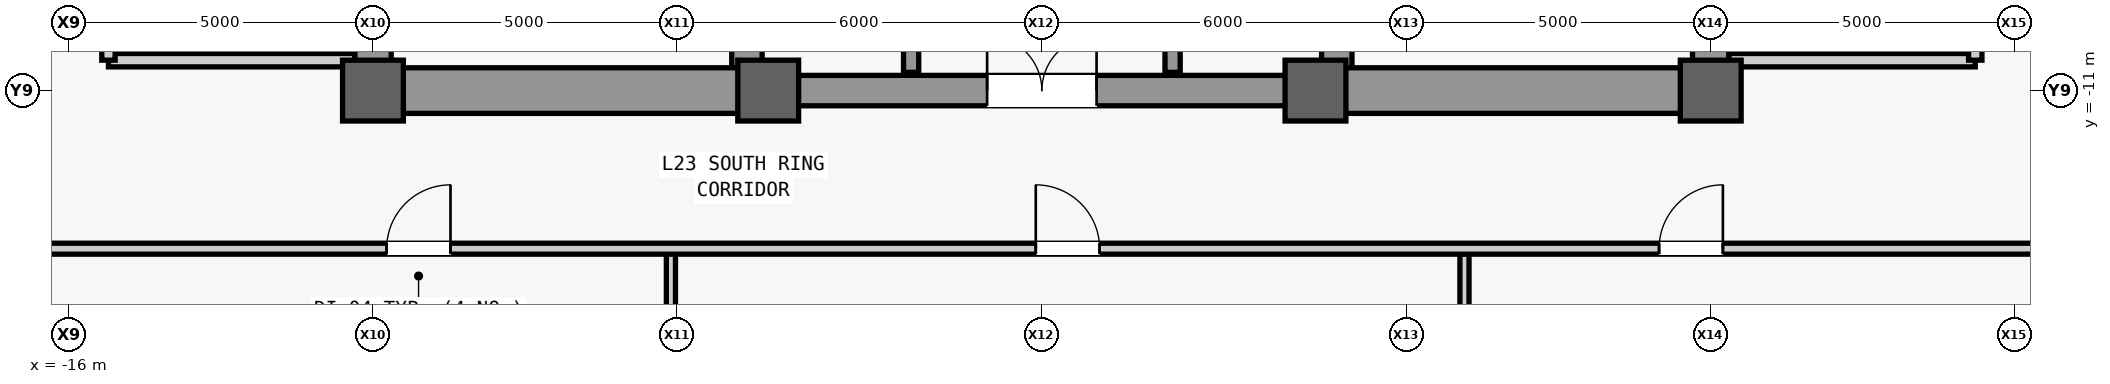
"""IFC4 building model, lengths in metres.
Left out: names, types, materials, properties, quantities, classifications, styles, units other than length and angle.
Written with IfcOpenShell. Run it as: python <this file> out.ifc"""

import sys

from ifc_helpers import new_model, si_unit, direction, frame, frame_2d, origin, origin_2d, place, context, subcontext, project, spatial, rectangle, extrude, source, transform, mapped, element, fill, save


model = new_model("IFC4")
c1 = context("Model", 3, precision=1e-05, world=origin(), true_north=direction((0.0, 1.0)))
c2 = subcontext(c1, "Body", "Model", "MODEL_VIEW")
j1 = project(units=[si_unit("LENGTHUNIT", "METRE"), si_unit("PLANEANGLEUNIT", "RADIAN")], contexts=[c1])
p1 = place(None, origin())
s1 = spatial("IfcSite", under=j1, at=p1, CompositionType="ELEMENT")
p2 = place(p1, origin())
s2 = spatial("IfcBuilding", under=s1, at=p2, CompositionType="ELEMENT")
p3 = place(p2, frame((0.0, 0.0, 103.7)))
s3 = spatial("IfcBuildingStorey", under=s2, at=p3, CompositionType="ELEMENT", Elevation=103.7)
m1 = source(origin(), c2, "Body", "SweptSolid", [
    extrude(rectangle(XDim=22.0, YDim=0.6, at=frame_2d((11.0, 0.0))), origin(), (0.0, 0.0, 1.0), 3.84),
])
p4 = place(p3, frame((-11.0, -11.0, 0.0), z_axis=(0.0, 0.0, 1.0), x_axis=(0.0, 1.0, 0.0)))
e1 = element("IfcWall", 1, at=p4, inside=s3, PredefinedType="SHEAR", context=c2, shape_type="MappedRepresentation", body=[
    mapped(m1, transform((0.0, 0.0, 0.0), scale=1.0)),
])
m2 = source(origin(), c2, "Body", "SweptSolid", [
    extrude(rectangle(XDim=1.1, YDim=2.2, at=frame_2d((0.55, 1.1))), frame((0.0, 0.31, 0.0), z_axis=(0.0, -1.0, 0.0), x_axis=(1.0, 0.0, 0.0)), (0.0, 0.0, 1.0), 0.62),
])
p5 = place(p4, frame((0.8, 0.0, 0.0)))
e2 = element("IfcOpeningElement", 2, at=p5, cuts=e1, PredefinedType="OPENING", context=c2, shape_type="MappedRepresentation", body=[
    mapped(m2, transform((0.0, 0.0, 0.0), scale=1.0)),
])
p6 = place(p4, frame((12.5, 0.0, 0.0)))
e3 = element("IfcOpeningElement", 3, at=p6, cuts=e1, PredefinedType="OPENING", context=c2, shape_type="MappedRepresentation", body=[
    mapped(m2, transform((0.0, 0.0, 0.0), scale=1.0)),
])
m3 = source(origin(), c2, "Body", "SweptSolid", [
    extrude(rectangle(XDim=0.9, YDim=2.15, at=frame_2d((0.45, 1.075))), frame((0.0, 0.31, 0.0), z_axis=(0.0, -1.0, 0.0), x_axis=(1.0, 0.0, 0.0)), (0.0, 0.0, 1.0), 0.62),
])
p7 = place(p4, frame((6.2, 0.0, 0.0)))
e4 = element("IfcOpeningElement", 4, at=p7, cuts=e1, PredefinedType="OPENING", context=c2, shape_type="MappedRepresentation", body=[
    mapped(m3, transform((0.0, 0.0, 0.0), scale=1.0)),
])
p8 = place(p4, frame((8.525, 0.0, 0.0)))
e5 = element("IfcOpeningElement", 5, at=p8, cuts=e1, PredefinedType="OPENING", context=c2, shape_type="MappedRepresentation", body=[
    mapped(m3, transform((0.0, 0.0, 0.0), scale=1.0)),
])
m4 = source(origin(), c2, "Body", "SweptSolid", [
    extrude(rectangle(XDim=1.3, YDim=2.3, at=frame_2d((0.65, 1.15))), frame((0.0, 0.31, 0.0), z_axis=(0.0, -1.0, 0.0), x_axis=(1.0, 0.0, 0.0)), (0.0, 0.0, 1.0), 0.62),
])
p9 = place(p4, frame((2.7, 0.0, 0.0)))
e6 = element("IfcOpeningElement", 6, at=p9, cuts=e1, PredefinedType="OPENING", context=c2, shape_type="MappedRepresentation", body=[
    mapped(m4, transform((0.0, 0.0, 0.0), scale=1.0)),
])
p10 = place(p3, frame((11.0, -11.0, 0.0), z_axis=(0.0, 0.0, 1.0), x_axis=(0.0, 1.0, 0.0)))
e7 = element("IfcWall", 7, at=p10, inside=s3, PredefinedType="SHEAR", context=c2, shape_type="MappedRepresentation", body=[
    mapped(m1, transform((0.0, 0.0, 0.0), scale=1.0)),
])
p11 = place(p10, frame((0.8, 0.0, 0.0)))
e8 = element("IfcOpeningElement", 8, at=p11, cuts=e7, PredefinedType="OPENING", context=c2, shape_type="MappedRepresentation", body=[
    mapped(m2, transform((0.0, 0.0, 0.0), scale=1.0)),
])
p12 = place(p10, frame((6.2, 0.0, 0.0)))
e9 = element("IfcOpeningElement", 9, at=p12, cuts=e7, PredefinedType="OPENING", context=c2, shape_type="MappedRepresentation", body=[
    mapped(m3, transform((0.0, 0.0, 0.0), scale=1.0)),
])
p13 = place(p10, frame((8.525, 0.0, 0.0)))
e10 = element("IfcOpeningElement", 10, at=p13, cuts=e7, PredefinedType="OPENING", context=c2, shape_type="MappedRepresentation", body=[
    mapped(m3, transform((0.0, 0.0, 0.0), scale=1.0)),
])
p14 = place(p10, frame((2.7, 0.0, 0.0)))
e11 = element("IfcOpeningElement", 11, at=p14, cuts=e7, PredefinedType="OPENING", context=c2, shape_type="MappedRepresentation", body=[
    mapped(m4, transform((0.0, 0.0, 0.0), scale=1.0)),
])
p15 = place(p10, frame((13.35, 0.0, 0.0)))
e12 = element("IfcOpeningElement", 12, at=p15, cuts=e7, PredefinedType="OPENING", context=c2, shape_type="MappedRepresentation", body=[
    mapped(m4, transform((0.0, 0.0, 0.0), scale=1.0)),
])
m5 = source(origin(), c2, "Body", "SweptSolid", [
    extrude(rectangle(XDim=21.4, YDim=0.5, at=frame_2d((10.7, 0.0))), origin(), (0.0, 0.0, 1.0), 3.84),
])
for number, where, z_axis, x_axis in (
    (13, (-4.85, -10.7, 0.0), (0.0, 0.0, 1.0), (0.0, 1.0, 0.0)),
    (14, (4.85, -10.7, 0.0), (0.0, 0.0, 1.0), (0.0, 1.0, 0.0)),
):
    element("IfcWall", number, at=place(p3, frame(where, z_axis=z_axis, x_axis=x_axis)), inside=s3, PredefinedType="SHEAR", context=c2, shape_type="MappedRepresentation", body=[
        mapped(m5, transform((0.0, 0.0, 0.0), scale=1.0)),
    ])
m6 = source(origin(), c2, "Body", "SweptSolid", [
    extrude(rectangle(XDim=5.85, YDim=0.75, at=frame_2d((2.925, 0.0))), origin(), (0.0, 0.0, 1.0), 3.84),
])
for number, where, z_axis, x_axis in (
    (15, (-10.7, -11.0, 0.0), (0.0, 0.0, 1.0), (1.0, 0.0, 0.0)),
    (16, (4.85, -11.0, 0.0), (0.0, 0.0, 1.0), (1.0, 0.0, 0.0)),
):
    element("IfcWall", number, at=place(p3, frame(where, z_axis=z_axis, x_axis=x_axis)), inside=s3, PredefinedType="SHEAR", context=c2, shape_type="MappedRepresentation", body=[
        mapped(m6, transform((0.0, 0.0, 0.0), scale=1.0)),
    ])
m7 = source(origin(), c2, "Body", "SweptSolid", [
    extrude(rectangle(XDim=9.2, YDim=0.5, at=frame_2d((4.6, 0.0))), origin(), (0.0, 0.0, 1.0), 3.84),
])
p16 = place(p3, frame((-4.6, -11.0, 0.0), z_axis=(0.0, 0.0, 1.0), x_axis=(1.0, 0.0, 0.0)))
e17 = element("IfcWall", 17, at=p16, inside=s3, PredefinedType="SHEAR", context=c2, shape_type="MappedRepresentation", body=[
    mapped(m7, transform((0.0, 0.0, 0.0), scale=1.0)),
])
m8 = source(origin(), c2, "Body", "SweptSolid", [
    extrude(rectangle(XDim=1.8, YDim=2.25, at=frame_2d((0.9, 1.125))), frame((0.0, 0.26, 0.0), z_axis=(0.0, -1.0, 0.0), x_axis=(1.0, 0.0, 0.0)), (0.0, 0.0, 1.0), 0.52),
])
p17 = place(p16, frame((3.7, 0.0, 0.0)))
e18 = element("IfcOpeningElement", 18, at=p17, cuts=e17, PredefinedType="OPENING", context=c2, shape_type="MappedRepresentation", body=[
    mapped(m8, transform((0.0, 0.0, 0.0), scale=1.0)),
])
m9 = source(origin(), c2, "Body", "SweptSolid", [
    extrude(rectangle(XDim=1.0, YDim=1.0, at=origin_2d()), origin(), (0.0, 0.0, 1.0), 4.1),
])
for number, where, z_axis, x_axis in (
    (19, (-11.0, -11.0, 0.0), (0.0, 0.0, 1.0), (1.0, 0.0, 0.0)),
    (20, (-4.5, -11.0, 0.0), (0.0, 0.0, 1.0), (1.0, 0.0, 0.0)),
    (21, (4.5, -11.0, 0.0), (0.0, 0.0, 1.0), (1.0, 0.0, 0.0)),
    (22, (11.0, -11.0, 0.0), (0.0, 0.0, 1.0), (1.0, 0.0, 0.0)),
):
    element("IfcColumn", number, at=place(p3, frame(where, z_axis=z_axis, x_axis=x_axis)), inside=s3, PredefinedType="COLUMN", context=c2, shape_type="MappedRepresentation", body=[
        mapped(m9, transform((0.0, 0.0, 0.0), scale=1.0)),
    ])
m10 = source(origin(), c2, "Body", "SweptSolid", [
    extrude(rectangle(XDim=4.05, YDim=0.22, at=frame_2d((2.025, 0.0))), origin(), (0.0, 0.0, 1.0), 3.84),
])
p18 = place(p3, frame((-15.35, -10.5, 0.0), z_axis=(0.0, 0.0, 1.0), x_axis=(1.0, 0.0, 0.0)))
e23 = element("IfcWall", 23, at=p18, inside=s3, PredefinedType="PARTITIONING", context=c2, shape_type="MappedRepresentation", body=[
    mapped(m10, transform((0.0, 0.0, 0.0), scale=1.0)),
])
m11 = source(origin(), c2, "Body", "SweptSolid", [
    extrude(rectangle(XDim=4.4, YDim=0.22, at=frame_2d((2.2, 0.0))), origin(), (0.0, 0.0, 1.0), 3.84),
])
p19 = place(p3, frame((-15.35, -10.5, 0.0), z_axis=(0.0, 0.0, 1.0), x_axis=(0.0, 1.0, 0.0)))
e24 = element("IfcWall", 24, at=p19, inside=s3, PredefinedType="PARTITIONING", context=c2, shape_type="MappedRepresentation", body=[
    mapped(m11, transform((0.0, 0.0, 0.0), scale=1.0)),
])
m12 = source(origin(), c2, "Body", "SweptSolid", [
    extrude(rectangle(XDim=1.2, YDim=2.2, at=frame_2d((0.6, 1.1))), frame((0.0, 0.12, 0.0), z_axis=(0.0, -1.0, 0.0), x_axis=(1.0, 0.0, 0.0)), (0.0, 0.0, 1.0), 0.24),
])
p20 = place(p19, frame((1.6, 0.0, 0.0)))
e25 = element("IfcOpeningElement", 25, at=p20, cuts=e24, PredefinedType="OPENING", context=c2, shape_type="MappedRepresentation", body=[
    mapped(m12, transform((0.0, 0.0, 0.0), scale=1.0)),
])
p21 = place(p3, frame((11.3, -10.5, 0.0), z_axis=(0.0, 0.0, 1.0), x_axis=(1.0, 0.0, 0.0)))
e26 = element("IfcWall", 26, at=p21, inside=s3, PredefinedType="PARTITIONING", context=c2, shape_type="MappedRepresentation", body=[
    mapped(m10, transform((0.0, 0.0, 0.0), scale=1.0)),
])
p22 = place(p3, frame((15.35, -10.5, 0.0), z_axis=(0.0, 0.0, 1.0), x_axis=(0.0, 1.0, 0.0)))
e27 = element("IfcWall", 27, at=p22, inside=s3, PredefinedType="PARTITIONING", context=c2, shape_type="MappedRepresentation", body=[
    mapped(m11, transform((0.0, 0.0, 0.0), scale=1.0)),
])
p23 = place(p22, frame((1.6, 0.0, 0.0)))
e28 = element("IfcOpeningElement", 28, at=p23, cuts=e27, PredefinedType="OPENING", context=c2, shape_type="MappedRepresentation", body=[
    mapped(m12, transform((0.0, 0.0, 0.0), scale=1.0)),
])
m13 = source(origin(), c2, "Body", "SweptSolid", [
    extrude(rectangle(XDim=5.4, YDim=0.25, at=frame_2d((2.7, 0.0))), origin(), (0.0, 0.0, 1.0), 3.84),
])
p24 = place(p3, frame((-2.15, -10.7, 0.0), z_axis=(0.0, 0.0, 1.0), x_axis=(0.0, 1.0, 0.0)))
e29 = element("IfcWall", 29, at=p24, inside=s3, PredefinedType="SHEAR", context=c2, shape_type="MappedRepresentation", body=[
    mapped(m13, transform((0.0, 0.0, 0.0), scale=1.0)),
])
m14 = source(origin(), c2, "Body", "SweptSolid", [
    extrude(rectangle(XDim=1.2, YDim=2.3, at=frame_2d((0.6, 1.15))), frame((0.0, 0.135, 0.0), z_axis=(0.0, -1.0, 0.0), x_axis=(1.0, 0.0, 0.0)), (0.0, 0.0, 1.0), 0.27),
])
p25 = place(p24, frame((0.9, 0.0, 0.0)))
e30 = element("IfcOpeningElement", 30, at=p25, cuts=e29, PredefinedType="OPENING", context=c2, shape_type="MappedRepresentation", body=[
    mapped(m14, transform((0.0, 0.0, 0.0), scale=1.0)),
])
p26 = place(p24, frame((3.2, 0.0, 0.0)))
e31 = element("IfcOpeningElement", 31, at=p26, cuts=e29, PredefinedType="OPENING", context=c2, shape_type="MappedRepresentation", body=[
    mapped(m14, transform((0.0, 0.0, 0.0), scale=1.0)),
])
p27 = place(p3, frame((2.15, -10.7, 0.0), z_axis=(0.0, 0.0, 1.0), x_axis=(0.0, 1.0, 0.0)))
e32 = element("IfcWall", 32, at=p27, inside=s3, PredefinedType="SHEAR", context=c2, shape_type="MappedRepresentation", body=[
    mapped(m13, transform((0.0, 0.0, 0.0), scale=1.0)),
])
p28 = place(p27, frame((0.9, 0.0, 0.0)))
e33 = element("IfcOpeningElement", 33, at=p28, cuts=e32, PredefinedType="OPENING", context=c2, shape_type="MappedRepresentation", body=[
    mapped(m14, transform((0.0, 0.0, 0.0), scale=1.0)),
])
p29 = place(p27, frame((3.2, 0.0, 0.0)))
e34 = element("IfcOpeningElement", 34, at=p29, cuts=e32, PredefinedType="OPENING", context=c2, shape_type="MappedRepresentation", body=[
    mapped(m14, transform((0.0, 0.0, 0.0), scale=1.0)),
])
m15 = source(origin(), c2, "Body", "SweptSolid", [
    extrude(rectangle(XDim=18.4, YDim=0.15, at=frame_2d((9.2, 0.0))), origin(), (0.0, 0.0, 1.0), 3.067),
])
p30 = place(p3, frame((-6.1, -32.0, 0.0), z_axis=(0.0, 0.0, 1.0), x_axis=(0.0, 1.0, 0.0)))
e35 = element("IfcWall", 35, at=p30, inside=s3, PredefinedType="PARTITIONING", context=c2, shape_type="MappedRepresentation", body=[
    mapped(m15, transform((0.0, 0.0, 0.0), scale=1.0)),
])
m16 = source(origin(), c2, "Body", "SweptSolid", [
    extrude(rectangle(XDim=18.4, YDim=0.15, at=frame_2d((9.2, 0.0))), origin(), (0.0, 0.0, 1.0), 3.84),
])
p31 = place(p3, frame((6.95, -32.0, 0.0), z_axis=(0.0, 0.0, 1.0), x_axis=(0.0, 1.0, 0.0)))
e36 = element("IfcWall", 36, at=p31, inside=s3, PredefinedType="PARTITIONING", context=c2, shape_type="MappedRepresentation", body=[
    mapped(m16, transform((0.0, 0.0, 0.0), scale=1.0)),
])
m17 = source(origin(), c2, "Body", "SweptSolid", [
    extrude(rectangle(XDim=36.25, YDim=0.18, at=frame_2d((18.125, 0.0))), origin(), (0.0, 0.0, 1.0), 3.84),
])
p32 = place(p3, frame((-17.7, -13.6, 0.0), z_axis=(0.0, 0.0, 1.0), x_axis=(1.0, 0.0, 0.0)))
e37 = element("IfcWall", 37, at=p32, inside=s3, PredefinedType="PARTITIONING", context=c2, shape_type="MappedRepresentation", body=[
    mapped(m17, transform((0.0, 0.0, 0.0), scale=1.0)),
])
m18 = source(origin(), c2, "Body", "SweptSolid", [
    extrude(rectangle(XDim=1.05, YDim=2.2, at=frame_2d((0.525, 1.1))), frame((0.0, 0.1, 0.0), z_axis=(0.0, -1.0, 0.0), x_axis=(1.0, 0.0, 0.0)), (0.0, 0.0, 1.0), 0.2),
])
p33 = place(p32, frame((6.925, 0.0, 0.0)))
e38 = element("IfcOpeningElement", 38, at=p33, cuts=e37, PredefinedType="OPENING", context=c2, shape_type="MappedRepresentation", body=[
    mapped(m18, transform((0.0, 0.0, 0.0), scale=1.0)),
])
p34 = place(p32, frame((17.6, 0.0, 0.0)))
e39 = element("IfcOpeningElement", 39, at=p34, cuts=e37, PredefinedType="OPENING", context=c2, shape_type="MappedRepresentation", body=[
    mapped(m18, transform((0.0, 0.0, 0.0), scale=1.0)),
])
p35 = place(p32, frame((27.85, 0.0, 0.0)))
e40 = element("IfcOpeningElement", 40, at=p35, cuts=e37, PredefinedType="OPENING", context=c2, shape_type="MappedRepresentation", body=[
    mapped(m18, transform((0.0, 0.0, 0.0), scale=1.0)),
])
m19 = source(origin(), c2, "Body", "SweptSolid", [
    extrude(rectangle(XDim=1.8, YDim=2.25, at=frame_2d((0.9, 1.125))), frame((0.0, 0.025, 0.0), z_axis=(0.0, -1.0, 0.0), x_axis=(1.0, 0.0, 0.0)), (0.0, 0.0, 1.0), 0.05),
])
p36 = place(p17, origin())
e41 = element("IfcDoor", 41, at=p36, inside=s3, OperationType="SINGLE_SWING_LEFT", PredefinedType="DOOR", context=c2, shape_type="MappedRepresentation", body=[
    mapped(m19, transform((0.0, 0.0, 0.0), scale=1.0)),
])
fill(e18, e41)
m20 = source(origin(), c2, "Body", "SweptSolid", [
    extrude(rectangle(XDim=1.05, YDim=2.2, at=frame_2d((0.525, 1.1))), frame((0.0, 0.025, 0.0), z_axis=(0.0, -1.0, 0.0), x_axis=(1.0, 0.0, 0.0)), (0.0, 0.0, 1.0), 0.05),
])
p37 = place(p33, origin())
e42 = element("IfcDoor", 42, at=p37, inside=s3, OperationType="SINGLE_SWING_RIGHT", PredefinedType="DOOR", context=c2, shape_type="MappedRepresentation", body=[
    mapped(m20, transform((0.0, 0.0, 0.0), scale=1.0)),
])
fill(e38, e42)
p38 = place(p34, origin())
e43 = element("IfcDoor", 43, at=p38, inside=s3, OperationType="SINGLE_SWING_LEFT", PredefinedType="DOOR", context=c2, shape_type="MappedRepresentation", body=[
    mapped(m20, transform((0.0, 0.0, 0.0), scale=1.0)),
])
fill(e39, e43)
p39 = place(p35, origin())
e44 = element("IfcDoor", 44, at=p39, inside=s3, OperationType="SINGLE_SWING_RIGHT", PredefinedType="DOOR", context=c2, shape_type="MappedRepresentation", body=[
    mapped(m20, transform((0.0, 0.0, 0.0), scale=1.0)),
])
fill(e40, e44)
save(model, sys.argv[1])
